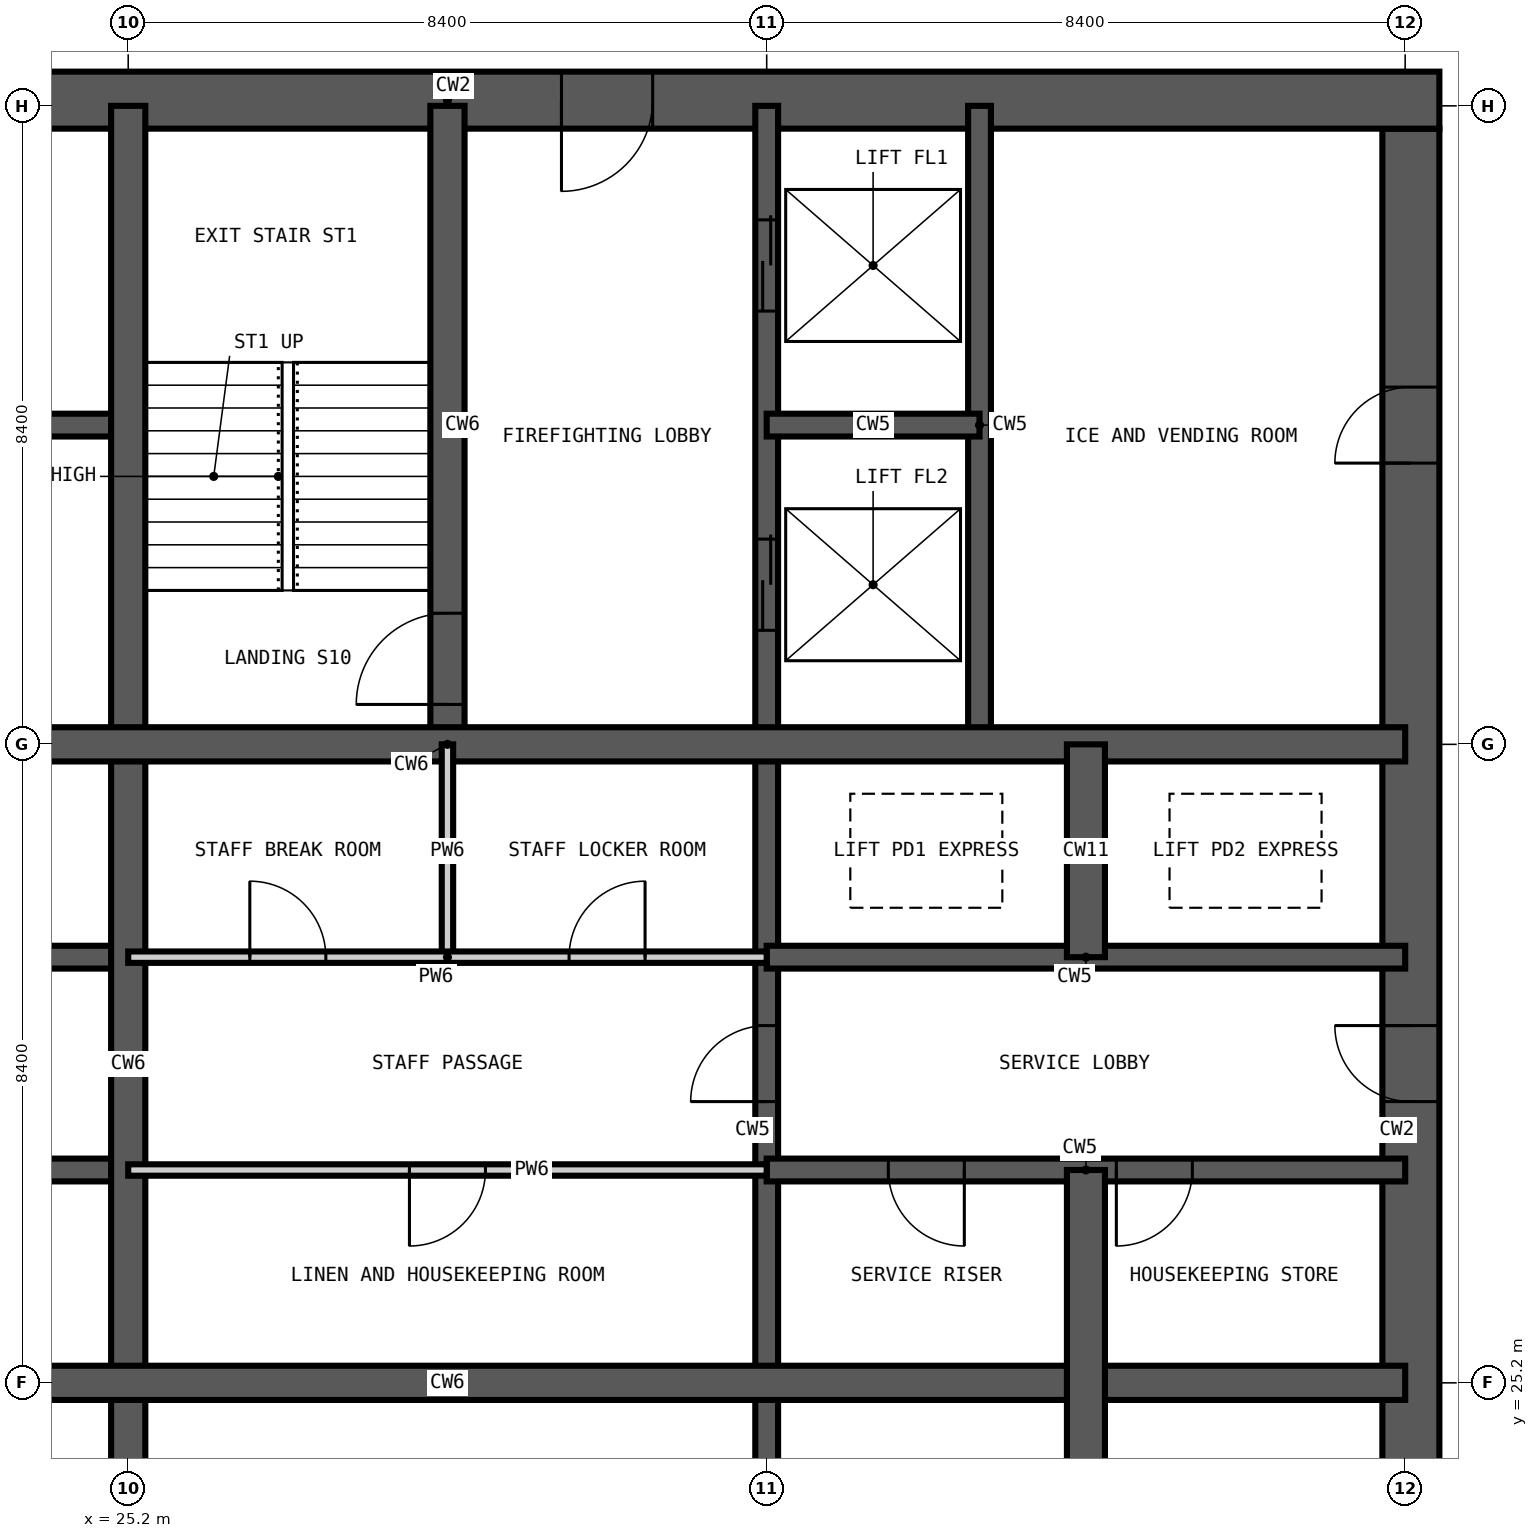
"""IFC4 building model, lengths in metres.
Left out: names, types, materials, properties, quantities, classifications, styles, units other than length and angle.
Written with IfcOpenShell. Run it as: python <this file> out.ifc"""

import sys

from ifc_helpers import new_model, si_unit, direction, frame, frame_2d, origin, place, context, subcontext, project, spatial, rectangle, extrude, element, fill, save


model = new_model("IFC4")
c1 = context("Model", 3, precision=1e-05, world=origin(), true_north=direction((0.0, 1.0)))
c2 = subcontext(c1, "Body", "Model", "MODEL_VIEW")
j1 = project(units=[si_unit("LENGTHUNIT", "METRE"), si_unit("PLANEANGLEUNIT", "RADIAN")], contexts=[c1])
p1 = place(None, origin())
s1 = spatial("IfcSite", under=j1, at=p1, CompositionType="ELEMENT")
p2 = place(p1, origin())
s2 = spatial("IfcBuilding", under=s1, at=p2, CompositionType="ELEMENT")
p3 = place(p2, frame((0.0, 0.0, 166.2)))
s3 = spatial("IfcBuildingStorey", under=s2, at=p3, CompositionType="ELEMENT", Elevation=166.2)
p4 = place(p3, frame((42.075, 17.1, -0.35), z_axis=(0.0, 0.0, 1.0), x_axis=(0.0, 1.0, 0.0)))
e1 = element("IfcWall", 1, at=p4, inside=s3, PredefinedType="SHEAR", context=c2, shape_type="SweptSolid", body=[
    extrude(rectangle(XDim=24.6, YDim=0.75, at=frame_2d((12.3, 0.0))), origin(), (0.0, 0.0, 1.0), 3.6),
])
p5 = place(p4, frame((0.5, 0.0, 0.35)))
e2 = element("IfcOpeningElement", 2, at=p5, cuts=e1, PredefinedType="OPENING", context=c2, shape_type="SweptSolid", body=[
    extrude(rectangle(XDim=1.2, YDim=2.2, at=frame_2d((0.6, 1.1))), frame((0.0, 0.385, 0.0), z_axis=(0.0, -1.0, 0.0), x_axis=(1.0, 0.0, 0.0)), (0.0, 0.0, 1.0), 0.77),
])
p6 = place(p4, frame((11.8, 0.0, 0.35)))
e3 = element("IfcOpeningElement", 3, at=p6, cuts=e1, PredefinedType="OPENING", context=c2, shape_type="SweptSolid", body=[
    extrude(rectangle(XDim=1.0, YDim=2.1, at=frame_2d((0.5, 1.05))), frame((0.0, 0.385, 0.0), z_axis=(0.0, -1.0, 0.0), x_axis=(1.0, 0.0, 0.0)), (0.0, 0.0, 1.0), 0.77),
])
p7 = place(p4, frame((20.2, 0.0, 0.35)))
e4 = element("IfcOpeningElement", 4, at=p7, cuts=e1, PredefinedType="OPENING", context=c2, shape_type="SweptSolid", body=[
    extrude(rectangle(XDim=1.0, YDim=2.1, at=frame_2d((0.5, 1.05))), frame((0.0, 0.385, 0.0), z_axis=(0.0, -1.0, 0.0), x_axis=(1.0, 0.0, 0.0)), (0.0, 0.0, 1.0), 0.77),
])
p8 = place(p3, frame((42.45, 42.075, -0.35), z_axis=(0.0, 0.0, 1.0), x_axis=(-1.0, 0.0, 0.0)))
e5 = element("IfcWall", 5, at=p8, inside=s3, PredefinedType="SHEAR", context=c2, shape_type="SweptSolid", body=[
    extrude(rectangle(XDim=26.1, YDim=0.75, at=frame_2d((13.05, 0.0))), origin(), (0.0, 0.0, 1.0), 3.6),
])
p9 = place(p8, frame((20.95, 0.0, 0.35)))
e6 = element("IfcOpeningElement", 6, at=p9, cuts=e5, PredefinedType="OPENING", context=c2, shape_type="SweptSolid", body=[
    extrude(rectangle(XDim=1.0, YDim=2.1, at=frame_2d((0.5, 1.05))), frame((0.0, 0.385, 0.0), z_axis=(0.0, -1.0, 0.0), x_axis=(1.0, 0.0, 0.0)), (0.0, 0.0, 1.0), 0.77),
])
p10 = place(p8, frame((10.35, 0.0, 0.35)))
e7 = element("IfcOpeningElement", 7, at=p10, cuts=e5, PredefinedType="OPENING", context=c2, shape_type="SweptSolid", body=[
    extrude(rectangle(XDim=1.2, YDim=2.2, at=frame_2d((0.6, 1.1))), frame((0.0, 0.385, 0.0), z_axis=(0.0, -1.0, 0.0), x_axis=(1.0, 0.0, 0.0)), (0.0, 0.0, 1.0), 0.77),
])
p11 = place(p3, frame((33.6, 16.8, -0.35), z_axis=(0.0, 0.0, 1.0), x_axis=(0.0, 1.0, 0.0)))
e8 = element("IfcWall", 8, at=p11, inside=s3, PredefinedType="SHEAR", context=c2, shape_type="SweptSolid", body=[
    extrude(rectangle(XDim=25.2, YDim=0.3, at=frame_2d((12.6, 0.0))), origin(), (0.0, 0.0, 1.0), 3.6),
])
p12 = place(p11, frame((22.5, 0.0, 0.35)))
e9 = element("IfcOpeningElement", 9, at=p12, cuts=e8, PredefinedType="OPENING", context=c2, shape_type="SweptSolid", body=[
    extrude(rectangle(XDim=1.2, YDim=2.2, at=frame_2d((0.6, 1.1))), frame((0.0, 0.16, 0.0), z_axis=(0.0, -1.0, 0.0), x_axis=(1.0, 0.0, 0.0)), (0.0, 0.0, 1.0), 0.32),
])
p13 = place(p11, frame((18.3, 0.0, 0.35)))
e10 = element("IfcOpeningElement", 10, at=p13, cuts=e8, PredefinedType="OPENING", context=c2, shape_type="SweptSolid", body=[
    extrude(rectangle(XDim=1.2, YDim=2.2, at=frame_2d((0.6, 1.1))), frame((0.0, 0.16, 0.0), z_axis=(0.0, -1.0, 0.0), x_axis=(1.0, 0.0, 0.0)), (0.0, 0.0, 1.0), 0.32),
])
p14 = place(p11, frame((12.1, 0.0, 0.35)))
e11 = element("IfcOpeningElement", 11, at=p14, cuts=e8, PredefinedType="OPENING", context=c2, shape_type="SweptSolid", body=[
    extrude(rectangle(XDim=1.0, YDim=2.1, at=frame_2d((0.5, 1.05))), frame((0.0, 0.16, 0.0), z_axis=(0.0, -1.0, 0.0), x_axis=(1.0, 0.0, 0.0)), (0.0, 0.0, 1.0), 0.32),
])
p15 = place(p3, frame((36.4, 33.6, -0.35), z_axis=(0.0, 0.0, 1.0), x_axis=(0.0, 1.0, 0.0)))
e12 = element("IfcWall", 12, at=p15, inside=s3, PredefinedType="SHEAR", context=c2, shape_type="SweptSolid", body=[
    extrude(rectangle(XDim=8.4, YDim=0.3, at=frame_2d((4.2, 0.0))), origin(), (0.0, 0.0, 1.0), 3.6),
])
p16 = place(p3, frame((16.8, 28.0, -0.35), z_axis=(0.0, 0.0, 1.0), x_axis=(1.0, 0.0, 0.0)))
e13 = element("IfcWall", 13, at=p16, inside=s3, PredefinedType="SHEAR", context=c2, shape_type="SweptSolid", body=[
    extrude(rectangle(XDim=8.4, YDim=0.3, at=frame_2d((4.2, 0.0))), origin(), (0.0, 0.0, 1.0), 3.6),
])
p17 = place(p16, frame((1.55, 0.0, 0.35)))
e14 = element("IfcOpeningElement", 14, at=p17, cuts=e13, PredefinedType="OPENING", context=c2, shape_type="SweptSolid", body=[
    extrude(rectangle(XDim=1.1, YDim=2.2, at=frame_2d((0.55, 1.1))), frame((0.0, 0.16, 0.0), z_axis=(0.0, -1.0, 0.0), x_axis=(1.0, 0.0, 0.0)), (0.0, 0.0, 1.0), 0.32),
])
p18 = place(p16, frame((5.75, 0.0, 0.35)))
e15 = element("IfcOpeningElement", 15, at=p18, cuts=e13, PredefinedType="OPENING", context=c2, shape_type="SweptSolid", body=[
    extrude(rectangle(XDim=1.1, YDim=2.2, at=frame_2d((0.55, 1.1))), frame((0.0, 0.16, 0.0), z_axis=(0.0, -1.0, 0.0), x_axis=(1.0, 0.0, 0.0)), (0.0, 0.0, 1.0), 0.32),
])
p19 = place(p3, frame((33.6, 28.0, -0.35), z_axis=(0.0, 0.0, 1.0), x_axis=(1.0, 0.0, 0.0)))
e16 = element("IfcWall", 16, at=p19, inside=s3, PredefinedType="SHEAR", context=c2, shape_type="SweptSolid", body=[
    extrude(rectangle(XDim=8.4, YDim=0.3, at=frame_2d((4.2, 0.0))), origin(), (0.0, 0.0, 1.0), 3.6),
])
p20 = place(p19, frame((1.6, 0.0, 0.35)))
e17 = element("IfcOpeningElement", 17, at=p20, cuts=e16, PredefinedType="OPENING", context=c2, shape_type="SweptSolid", body=[
    extrude(rectangle(XDim=1.0, YDim=2.1, at=frame_2d((0.5, 1.05))), frame((0.0, 0.16, 0.0), z_axis=(0.0, -1.0, 0.0), x_axis=(1.0, 0.0, 0.0)), (0.0, 0.0, 1.0), 0.32),
])
p21 = place(p19, frame((4.6, 0.0, 0.35)))
e18 = element("IfcOpeningElement", 18, at=p21, cuts=e16, PredefinedType="OPENING", context=c2, shape_type="SweptSolid", body=[
    extrude(rectangle(XDim=1.0, YDim=2.1, at=frame_2d((0.5, 1.05))), frame((0.0, 0.16, 0.0), z_axis=(0.0, -1.0, 0.0), x_axis=(1.0, 0.0, 0.0)), (0.0, 0.0, 1.0), 0.32),
])
p22 = place(p3, frame((16.8, 30.8, -0.35), z_axis=(0.0, 0.0, 1.0), x_axis=(1.0, 0.0, 0.0)))
e19 = element("IfcWall", 19, at=p22, inside=s3, PredefinedType="SHEAR", context=c2, shape_type="SweptSolid", body=[
    extrude(rectangle(XDim=8.4, YDim=0.3, at=frame_2d((4.2, 0.0))), origin(), (0.0, 0.0, 1.0), 3.6),
])
p23 = place(p22, frame((1.55, 0.0, 0.35)))
e20 = element("IfcOpeningElement", 20, at=p23, cuts=e19, PredefinedType="OPENING", context=c2, shape_type="SweptSolid", body=[
    extrude(rectangle(XDim=1.1, YDim=2.2, at=frame_2d((0.55, 1.1))), frame((0.0, 0.16, 0.0), z_axis=(0.0, -1.0, 0.0), x_axis=(1.0, 0.0, 0.0)), (0.0, 0.0, 1.0), 0.32),
])
p24 = place(p22, frame((5.75, 0.0, 0.35)))
e21 = element("IfcOpeningElement", 21, at=p24, cuts=e19, PredefinedType="OPENING", context=c2, shape_type="SweptSolid", body=[
    extrude(rectangle(XDim=1.1, YDim=2.2, at=frame_2d((0.55, 1.1))), frame((0.0, 0.16, 0.0), z_axis=(0.0, -1.0, 0.0), x_axis=(1.0, 0.0, 0.0)), (0.0, 0.0, 1.0), 0.32),
])
for number, where, z_axis, x_axis in (
    (22, (33.6, 30.8, -0.35), (0.0, 0.0, 1.0), (1.0, 0.0, 0.0)),
    (23, (16.8, 37.8, -0.35), (0.0, 0.0, 1.0), (1.0, 0.0, 0.0)),
):
    element("IfcWall", number, at=place(p3, frame(where, z_axis=z_axis, x_axis=x_axis)), inside=s3, PredefinedType="SHEAR", context=c2, shape_type="SweptSolid", body=[
        extrude(rectangle(XDim=8.4, YDim=0.3, at=frame_2d((4.2, 0.0))), origin(), (0.0, 0.0, 1.0), 3.6),
    ])
p25 = place(p3, frame((33.6, 37.8, -0.35), z_axis=(0.0, 0.0, 1.0), x_axis=(1.0, 0.0, 0.0)))
e24 = element("IfcWall", 24, at=p25, inside=s3, PredefinedType="SHEAR", context=c2, shape_type="SweptSolid", body=[
    extrude(rectangle(XDim=2.8, YDim=0.3, at=frame_2d((1.4, 0.0))), origin(), (0.0, 0.0, 1.0), 3.6),
])
p26 = place(p3, frame((25.2, 16.8, -0.35), z_axis=(0.0, 0.0, 1.0), x_axis=(0.0, 1.0, 0.0)))
e25 = element("IfcWall", 25, at=p26, inside=s3, PredefinedType="SHEAR", context=c2, shape_type="SweptSolid", body=[
    extrude(rectangle(XDim=25.2, YDim=0.45, at=frame_2d((12.6, 0.0))), origin(), (0.0, 0.0, 1.0), 3.6),
])
p27 = place(p3, frame((29.4, 33.6, -0.35), z_axis=(0.0, 0.0, 1.0), x_axis=(0.0, 1.0, 0.0)))
e26 = element("IfcWall", 26, at=p27, inside=s3, PredefinedType="SHEAR", context=c2, shape_type="SweptSolid", body=[
    extrude(rectangle(XDim=8.4, YDim=0.45, at=frame_2d((4.2, 0.0))), origin(), (0.0, 0.0, 1.0), 3.6),
])
p28 = place(p27, frame((0.525, 0.0, 0.35)))
e27 = element("IfcOpeningElement", 27, at=p28, cuts=e26, PredefinedType="OPENING", context=c2, shape_type="SweptSolid", body=[
    extrude(rectangle(XDim=1.2, YDim=2.2, at=frame_2d((0.6, 1.1))), frame((0.0, 0.235, 0.0), z_axis=(0.0, -1.0, 0.0), x_axis=(1.0, 0.0, 0.0)), (0.0, 0.0, 1.0), 0.47),
])
for number, where, z_axis, x_axis in (
    (28, (16.8, 25.2, -0.35), (0.0, 0.0, 1.0), (1.0, 0.0, 0.0)),
    (29, (16.8, 33.6, -0.35), (0.0, 0.0, 1.0), (1.0, 0.0, 0.0)),
):
    element("IfcWall", number, at=place(p3, frame(where, z_axis=z_axis, x_axis=x_axis)), inside=s3, PredefinedType="SHEAR", context=c2, shape_type="SweptSolid", body=[
        extrude(rectangle(XDim=25.2, YDim=0.45, at=frame_2d((12.6, 0.0))), origin(), (0.0, 0.0, 1.0), 3.6),
    ])
p29 = place(p3, frame((37.8, 16.8, -0.35), z_axis=(0.0, 0.0, 1.0), x_axis=(0.0, 1.0, 0.0)))
e30 = element("IfcWall", 30, at=p29, inside=s3, PredefinedType="SHEAR", context=c2, shape_type="SweptSolid", body=[
    extrude(rectangle(XDim=11.2, YDim=0.5, at=frame_2d((5.6, 0.0))), origin(), (0.0, 0.0, 1.0), 3.6),
])
p30 = place(p3, frame((37.8, 30.8, -0.35), z_axis=(0.0, 0.0, 1.0), x_axis=(0.0, 1.0, 0.0)))
e31 = element("IfcWall", 31, at=p30, inside=s3, PredefinedType="SHEAR", context=c2, shape_type="SweptSolid", body=[
    extrude(rectangle(XDim=2.8, YDim=0.5, at=frame_2d((1.4, 0.0))), origin(), (0.0, 0.0, 1.0), 3.6),
])
p31 = place(p3, frame((29.4, 30.8, 0.0), z_axis=(0.0, 0.0, 1.0), x_axis=(0.0, 1.0, 0.0)))
e32 = element("IfcWall", 32, at=p31, inside=s3, PredefinedType="PARTITIONING", context=c2, shape_type="SweptSolid", body=[
    extrude(rectangle(XDim=2.8, YDim=0.15, at=frame_2d((1.4, 0.0))), origin(), (0.0, 0.0, 1.0), 3.25),
])
p32 = place(p3, frame((25.2, 28.0, 0.0), z_axis=(0.0, 0.0, 1.0), x_axis=(1.0, 0.0, 0.0)))
e33 = element("IfcWall", 33, at=p32, inside=s3, PredefinedType="PARTITIONING", context=c2, shape_type="SweptSolid", body=[
    extrude(rectangle(XDim=8.4, YDim=0.15, at=frame_2d((4.2, 0.0))), origin(), (0.0, 0.0, 1.0), 3.25),
])
p33 = place(p32, frame((3.7, 0.0, 0.0)))
e34 = element("IfcOpeningElement", 34, at=p33, cuts=e33, PredefinedType="OPENING", context=c2, shape_type="SweptSolid", body=[
    extrude(rectangle(XDim=1.0, YDim=2.1, at=frame_2d((0.5, 1.05))), frame((0.0, 0.085, 0.0), z_axis=(0.0, -1.0, 0.0), x_axis=(1.0, 0.0, 0.0)), (0.0, 0.0, 1.0), 0.17),
])
p34 = place(p3, frame((25.2, 30.8, 0.0), z_axis=(0.0, 0.0, 1.0), x_axis=(1.0, 0.0, 0.0)))
e35 = element("IfcWall", 35, at=p34, inside=s3, PredefinedType="PARTITIONING", context=c2, shape_type="SweptSolid", body=[
    extrude(rectangle(XDim=8.4, YDim=0.15, at=frame_2d((4.2, 0.0))), origin(), (0.0, 0.0, 1.0), 3.25),
])
p35 = place(p34, frame((5.8, 0.0, 0.0)))
e36 = element("IfcOpeningElement", 36, at=p35, cuts=e35, PredefinedType="OPENING", context=c2, shape_type="SweptSolid", body=[
    extrude(rectangle(XDim=1.0, YDim=2.1, at=frame_2d((0.5, 1.05))), frame((0.0, 0.085, 0.0), z_axis=(0.0, -1.0, 0.0), x_axis=(1.0, 0.0, 0.0)), (0.0, 0.0, 1.0), 0.17),
])
p36 = place(p34, frame((1.6, 0.0, 0.0)))
e37 = element("IfcOpeningElement", 37, at=p36, cuts=e35, PredefinedType="OPENING", context=c2, shape_type="SweptSolid", body=[
    extrude(rectangle(XDim=1.0, YDim=2.1, at=frame_2d((0.5, 1.05))), frame((0.0, 0.085, 0.0), z_axis=(0.0, -1.0, 0.0), x_axis=(1.0, 0.0, 0.0)), (0.0, 0.0, 1.0), 0.17),
])
p37 = place(p28, origin())
e38 = element("IfcDoor", 38, at=p37, inside=s3, OperationType="SINGLE_SWING_LEFT", PredefinedType="DOOR", context=c2, shape_type="SweptSolid", body=[
    extrude(rectangle(XDim=1.2, YDim=2.2, at=frame_2d((0.6, 1.1))), frame((0.0, 0.025, 0.0), z_axis=(0.0, -1.0, 0.0), x_axis=(1.0, 0.0, 0.0)), (0.0, 0.0, 1.0), 0.05),
])
fill(e27, e38)
p38 = place(p12, origin())
e39 = element("IfcDoor", 39, at=p38, inside=s3, OperationType="DOUBLE_DOOR_SLIDING", PredefinedType="DOOR", context=c2, shape_type="SweptSolid", body=[
    extrude(rectangle(XDim=1.2, YDim=2.2, at=frame_2d((0.6, 1.1))), frame((0.0, 0.025, 0.0), z_axis=(0.0, -1.0, 0.0), x_axis=(1.0, 0.0, 0.0)), (0.0, 0.0, 1.0), 0.05),
])
fill(e9, e39)
p39 = place(p13, origin())
e40 = element("IfcDoor", 40, at=p39, inside=s3, OperationType="DOUBLE_DOOR_SLIDING", PredefinedType="DOOR", context=c2, shape_type="SweptSolid", body=[
    extrude(rectangle(XDim=1.2, YDim=2.2, at=frame_2d((0.6, 1.1))), frame((0.0, 0.025, 0.0), z_axis=(0.0, -1.0, 0.0), x_axis=(1.0, 0.0, 0.0)), (0.0, 0.0, 1.0), 0.05),
])
fill(e10, e40)
p40 = place(p14, origin())
e41 = element("IfcDoor", 41, at=p40, inside=s3, OperationType="SINGLE_SWING_LEFT", PredefinedType="DOOR", context=c2, shape_type="SweptSolid", body=[
    extrude(rectangle(XDim=1.0, YDim=2.1, at=frame_2d((0.5, 1.05))), frame((0.0, 0.025, 0.0), z_axis=(0.0, -1.0, 0.0), x_axis=(1.0, 0.0, 0.0)), (0.0, 0.0, 1.0), 0.05),
])
fill(e11, e41)
p41 = place(p33, frame((1.0, 0.0, 0.0), z_axis=(0.0, 0.0, 1.0), x_axis=(-1.0, 0.0, 0.0)))
e42 = element("IfcDoor", 42, at=p41, inside=s3, OperationType="SINGLE_SWING_RIGHT", PredefinedType="DOOR", context=c2, shape_type="SweptSolid", body=[
    extrude(rectangle(XDim=1.0, YDim=2.1, at=frame_2d((0.5, 1.05))), frame((0.0, 0.025, 0.0), z_axis=(0.0, -1.0, 0.0), x_axis=(1.0, 0.0, 0.0)), (0.0, 0.0, 1.0), 0.05),
])
fill(e34, e42)
p42 = place(p35, origin())
e43 = element("IfcDoor", 43, at=p42, inside=s3, OperationType="SINGLE_SWING_RIGHT", PredefinedType="DOOR", context=c2, shape_type="SweptSolid", body=[
    extrude(rectangle(XDim=1.0, YDim=2.1, at=frame_2d((0.5, 1.05))), frame((0.0, 0.025, 0.0), z_axis=(0.0, -1.0, 0.0), x_axis=(1.0, 0.0, 0.0)), (0.0, 0.0, 1.0), 0.05),
])
fill(e36, e43)
p43 = place(p36, origin())
e44 = element("IfcDoor", 44, at=p43, inside=s3, OperationType="SINGLE_SWING_LEFT", PredefinedType="DOOR", context=c2, shape_type="SweptSolid", body=[
    extrude(rectangle(XDim=1.0, YDim=2.1, at=frame_2d((0.5, 1.05))), frame((0.0, 0.025, 0.0), z_axis=(0.0, -1.0, 0.0), x_axis=(1.0, 0.0, 0.0)), (0.0, 0.0, 1.0), 0.05),
])
fill(e37, e44)
p44 = place(p20, frame((1.0, 0.0, 0.0), z_axis=(0.0, 0.0, 1.0), x_axis=(-1.0, 0.0, 0.0)))
e45 = element("IfcDoor", 45, at=p44, inside=s3, OperationType="SINGLE_SWING_LEFT", PredefinedType="DOOR", context=c2, shape_type="SweptSolid", body=[
    extrude(rectangle(XDim=1.0, YDim=2.1, at=frame_2d((0.5, 1.05))), frame((0.0, 0.025, 0.0), z_axis=(0.0, -1.0, 0.0), x_axis=(1.0, 0.0, 0.0)), (0.0, 0.0, 1.0), 0.05),
])
fill(e17, e45)
p45 = place(p21, frame((1.0, 0.0, 0.0), z_axis=(0.0, 0.0, 1.0), x_axis=(-1.0, 0.0, 0.0)))
e46 = element("IfcDoor", 46, at=p45, inside=s3, OperationType="SINGLE_SWING_RIGHT", PredefinedType="DOOR", context=c2, shape_type="SweptSolid", body=[
    extrude(rectangle(XDim=1.0, YDim=2.1, at=frame_2d((0.5, 1.05))), frame((0.0, 0.025, 0.0), z_axis=(0.0, -1.0, 0.0), x_axis=(1.0, 0.0, 0.0)), (0.0, 0.0, 1.0), 0.05),
])
fill(e18, e46)
p46 = place(p6, origin())
e47 = element("IfcDoor", 47, at=p46, inside=s3, OperationType="SINGLE_SWING_RIGHT", PredefinedType="DOOR", context=c2, shape_type="SweptSolid", body=[
    extrude(rectangle(XDim=1.0, YDim=2.1, at=frame_2d((0.5, 1.05))), frame((0.0, 0.025, 0.0), z_axis=(0.0, -1.0, 0.0), x_axis=(1.0, 0.0, 0.0)), (0.0, 0.0, 1.0), 0.05),
])
fill(e3, e47)
p47 = place(p10, origin())
e48 = element("IfcDoor", 48, at=p47, inside=s3, OperationType="SINGLE_SWING_RIGHT", PredefinedType="DOOR", context=c2, shape_type="SweptSolid", body=[
    extrude(rectangle(XDim=1.2, YDim=2.2, at=frame_2d((0.6, 1.1))), frame((0.0, 0.025, 0.0), z_axis=(0.0, -1.0, 0.0), x_axis=(1.0, 0.0, 0.0)), (0.0, 0.0, 1.0), 0.05),
])
fill(e7, e48)
p48 = place(p7, origin())
e49 = element("IfcDoor", 49, at=p48, inside=s3, OperationType="SINGLE_SWING_LEFT", PredefinedType="DOOR", context=c2, shape_type="SweptSolid", body=[
    extrude(rectangle(XDim=1.0, YDim=2.1, at=frame_2d((0.5, 1.05))), frame((0.0, 0.025, 0.0), z_axis=(0.0, -1.0, 0.0), x_axis=(1.0, 0.0, 0.0)), (0.0, 0.0, 1.0), 0.05),
])
fill(e4, e49)
save(model, sys.argv[1])
